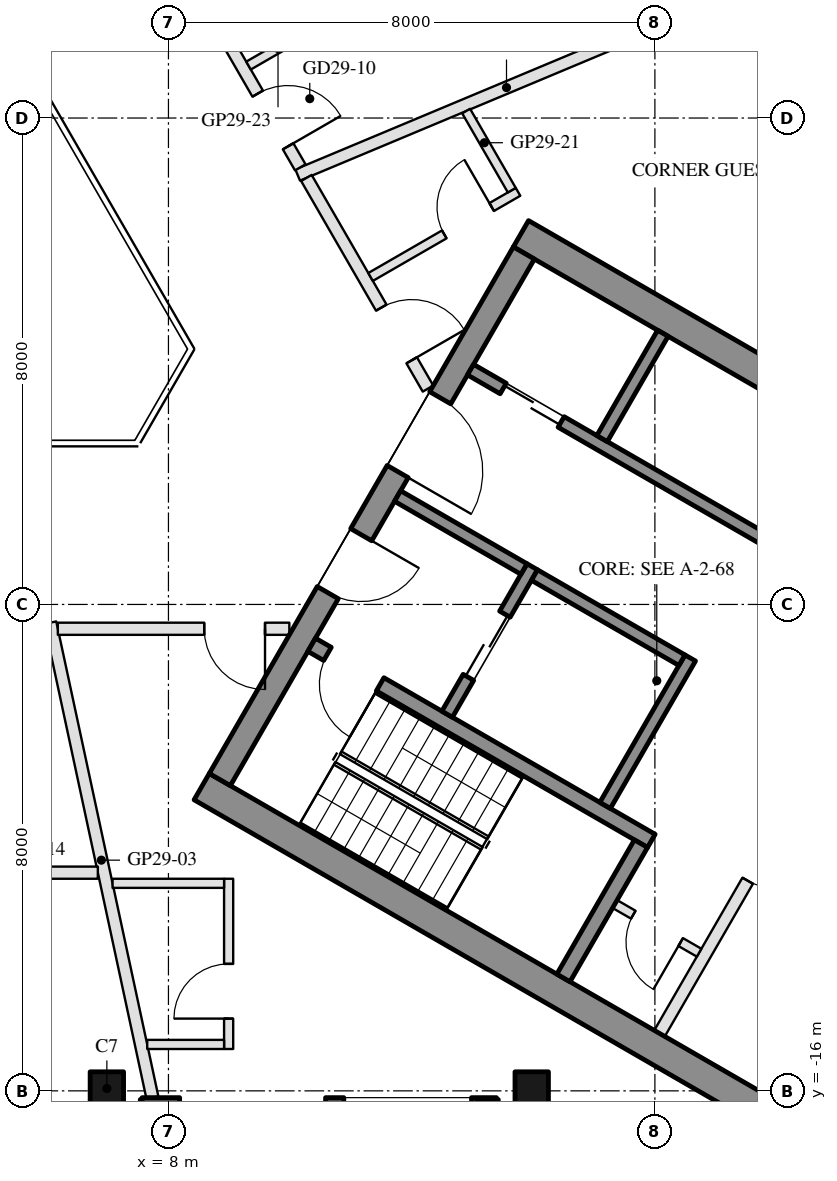
"""IFC4 building model, lengths in metres.
Left out: names, types, materials, properties, quantities, classifications, styles, units other than length and angle.
Written with IfcOpenShell. Run it as: python <this file> out.ifc"""

import sys

from ifc_helpers import new_model, si_unit, direction, frame, frame_2d, origin, origin_2d, place, context, subcontext, project, spatial, rectangle, hollow_rectangle, extrude, boolean, halfspace, element, fill, save


model = new_model("IFC4")
c1 = context("Model", 3, precision=1e-05, world=origin(), true_north=direction((0.0, 1.0)))
c2 = subcontext(c1, "Body", "Model", "MODEL_VIEW")
j1 = project(units=[si_unit("LENGTHUNIT", "METRE"), si_unit("PLANEANGLEUNIT", "RADIAN")], contexts=[c1])
p1 = place(None, origin())
s1 = spatial("IfcSite", under=j1, at=p1, CompositionType="ELEMENT")
p2 = place(p1, origin())
s2 = spatial("IfcBuilding", under=s1, at=p2, CompositionType="ELEMENT")
p3 = place(p2, frame((0.0, 0.0, 294.8)))
s3 = spatial("IfcBuildingStorey", under=s2, at=p3, CompositionType="ELEMENT", Elevation=294.8)
p4 = place(p3, frame((6.987, -15.962, 0.0), z_axis=(0.0, 0.0, 1.0), x_axis=(-1.0, 0.0, 0.0)))
e1 = element("IfcColumn", 1, at=p4, inside=s3, PredefinedType="COLUMN", context=c2, shape_type="SweptSolid", body=[
    boolean("DIFFERENCE", extrude(hollow_rectangle(XDim=0.55, YDim=0.55, WallThickness=0.025, at=origin_2d()), origin(), (0.0, 0.0, 1.0), 3.7), halfspace(frame((0.0, 0.0, 3.666), z_axis=(0.0, 0.0, 1.0), x_axis=(1.0, 0.0, 0.0)), False)),
])
p5 = place(p3, frame((13.974, -15.962, 0.0), z_axis=(0.0, 0.0, 1.0), x_axis=(-1.0, 0.0, 0.0)))
e2 = element("IfcColumn", 2, at=p5, inside=s3, PredefinedType="COLUMN", context=c2, shape_type="SweptSolid", body=[
    boolean("DIFFERENCE", extrude(hollow_rectangle(XDim=0.55, YDim=0.55, WallThickness=0.025, at=origin_2d()), origin(), (0.0, 0.0, 1.0), 3.7), halfspace(frame((0.0, 0.0, 3.66), z_axis=(0.0, 0.0, 1.0), x_axis=(1.0, 0.0, 0.0)), False)),
])
p6 = place(p3, frame((7.712, -17.362, 0.0), z_axis=(0.0, 0.0, 1.0), x_axis=(0.0, 1.0, 0.0)))
e3 = element("IfcWall", 3, at=p6, inside=s3, PredefinedType="SOLIDWALL", context=c2, shape_type="SweptSolid", body=[
    extrude(rectangle(XDim=1.22, YDim=0.35, at=frame_2d((0.61, 0.0))), origin(), (0.0, 0.0, 1.0), 3.55),
])
p7 = place(p3, frame((7.567, -16.287, 0.0), z_axis=(0.0, 0.0, 1.0), x_axis=(1.0, 0.0, 0.0)))
e4 = element("IfcWall", 4, at=p7, inside=s3, PredefinedType="SOLIDWALL", context=c2, shape_type="SweptSolid", body=[
    extrude(rectangle(XDim=5.827, YDim=0.35, at=frame_2d((2.914, 0.0))), origin(), (0.0, 0.0, 1.0), 3.55),
])
p8 = place(p7, frame((0.617, 0.0, 0.0)))
e5 = element("IfcOpeningElement", 5, at=p8, cuts=e4, PredefinedType="OPENING", context=c2, shape_type="SweptSolid", body=[
    extrude(rectangle(XDim=2.4, YDim=2.4, at=frame_2d((1.2, 1.2))), frame((0.0, 0.185, 0.0), z_axis=(0.0, -1.0, 0.0), x_axis=(1.0, 0.0, 0.0)), (0.0, 0.0, 1.0), 0.37),
])
p9 = place(p7, frame((3.317, 0.0, 0.3)))
e6 = element("IfcOpeningElement", 6, at=p9, cuts=e4, PredefinedType="OPENING", context=c2, shape_type="SweptSolid", body=[
    extrude(rectangle(XDim=2.1, YDim=2.65, at=frame_2d((1.05, 1.325))), frame((0.0, 0.185, 0.0), z_axis=(0.0, -1.0, 0.0), x_axis=(1.0, 0.0, 0.0)), (0.0, 0.0, 1.0), 0.37),
])
p10 = place(p3, frame((13.249, -16.142, 0.0), z_axis=(0.0, 0.0, 1.0), x_axis=(0.0, -1.0, 0.0)))
e7 = element("IfcWall", 7, at=p10, inside=s3, PredefinedType="SOLIDWALL", context=c2, shape_type="SweptSolid", body=[
    extrude(rectangle(XDim=1.22, YDim=0.35, at=frame_2d((0.61, 0.0))), origin(), (0.0, 0.0, 1.0), 3.55),
])
for number, where, z_axis, x_axis in (
    (8, (8.547, -10.997, 0.0), (0.0, 0.0, 1.0), (0.866, -0.5, 0.0)),
    (9, (13.797, -1.903, 0.0), (0.0, 0.0, 1.0), (0.866, -0.5, 0.0)),
):
    element("IfcWall", number, at=place(p3, frame(where, z_axis=z_axis, x_axis=x_axis)), inside=s3, PredefinedType="SHEAR", context=c2, shape_type="SweptSolid", body=[
        extrude(rectangle(XDim=11.222, YDim=0.5, at=frame_2d((5.611, 0.0))), origin(), (0.0, 0.0, 1.0), 3.5),
    ])
p11 = place(p3, frame((8.845, -10.88, 0.0), z_axis=(0.0, 0.0, 1.0), x_axis=(0.500004234368, 0.866022959057, 0.0)))
e10 = element("IfcWall", 10, at=p11, inside=s3, PredefinedType="SHEAR", context=c2, shape_type="SweptSolid", body=[
    extrude(rectangle(XDim=10.0, YDim=0.4, at=frame_2d((5.0, 0.0))), origin(), (0.0, 0.0, 1.0), 3.5),
])
p12 = place(p11, frame((3.55, 0.0, 0.0)))
e11 = element("IfcOpeningElement", 11, at=p12, cuts=e10, PredefinedType="OPENING", context=c2, shape_type="SweptSolid", body=[
    extrude(rectangle(XDim=1.1, YDim=2.1, at=frame_2d((0.55, 1.05))), frame((0.0, 0.21, 0.0), z_axis=(0.0, -1.0, 0.0), x_axis=(1.0, 0.0, 0.0)), (0.0, 0.0, 1.0), 0.42),
])
p13 = place(p11, frame((5.85, 0.0, 0.0)))
e12 = element("IfcOpeningElement", 12, at=p13, cuts=e10, PredefinedType="OPENING", context=c2, shape_type="SweptSolid", body=[
    extrude(rectangle(XDim=1.4, YDim=2.1, at=frame_2d((0.7, 1.05))), frame((0.0, 0.21, 0.0), z_axis=(0.0, -1.0, 0.0), x_axis=(1.0, 0.0, 0.0)), (0.0, 0.0, 1.0), 0.42),
])
p14 = place(p3, frame((10.356, -8.664, 0.0), z_axis=(0.0, 0.0, 1.0), x_axis=(0.866028629588, -0.499994412703, 0.0)))
e13 = element("IfcWall", 13, at=p14, inside=s3, PredefinedType="SHEAR", context=c2, shape_type="SweptSolid", body=[
    extrude(rectangle(XDim=6.45, YDim=0.25, at=frame_2d((3.225, 0.0))), origin(), (0.0, 0.0, 1.0), 3.5),
])
p15 = place(p14, frame((0.3, 0.0, 0.0)))
e14 = element("IfcOpeningElement", 14, at=p15, cuts=e13, PredefinedType="OPENING", context=c2, shape_type="SweptSolid", body=[
    extrude(rectangle(XDim=1.0, YDim=2.1, at=frame_2d((0.5, 1.05))), frame((0.0, 0.135, 0.0), z_axis=(0.0, -1.0, 0.0), x_axis=(1.0, 0.0, 0.0)), (0.0, 0.0, 1.0), 0.27),
])
p16 = place(p3, frame((14.496, -14.143, 0.0), z_axis=(0.0, 0.0, 1.0), x_axis=(0.500062241894, 0.865989465428, 0.0)))
e15 = element("IfcWall", 15, at=p16, inside=s3, PredefinedType="SHEAR", context=c2, shape_type="SweptSolid", body=[
    extrude(rectangle(XDim=2.55, YDim=0.25, at=frame_2d((1.275, 0.0))), origin(), (0.0, 0.0, 1.0), 3.5),
])
p17 = place(p3, frame((15.181, -11.305, 0.0), z_axis=(0.0, 0.0, 1.0), x_axis=(0.49994636267, 0.866056369097, 0.0)))
e16 = element("IfcWall", 16, at=p17, inside=s3, PredefinedType="SHEAR", context=c2, shape_type="SweptSolid", body=[
    extrude(rectangle(XDim=2.8, YDim=0.2, at=frame_2d((1.4, 0.0))), origin(), (0.0, 0.0, 1.0), 3.5),
])
p18 = place(p3, frame((12.583, -9.805, 0.0), z_axis=(0.0, 0.0, 1.0), x_axis=(0.49994636267, 0.866056369097, 0.0)))
e17 = element("IfcWall", 17, at=p18, inside=s3, PredefinedType="SHEAR", context=c2, shape_type="SweptSolid", body=[
    extrude(rectangle(XDim=2.8, YDim=0.2, at=frame_2d((1.4, 0.0))), origin(), (0.0, 0.0, 1.0), 3.5),
])
p19 = place(p18, frame((0.7, 0.0, 0.0)))
e18 = element("IfcOpeningElement", 18, at=p19, cuts=e17, PredefinedType="OPENING", context=c2, shape_type="SweptSolid", body=[
    extrude(rectangle(XDim=1.2, YDim=2.1, at=frame_2d((0.6, 1.05))), frame((0.0, 0.11, 0.0), z_axis=(0.0, -1.0, 0.0), x_axis=(1.0, 0.0, 0.0)), (0.0, 0.0, 1.0), 0.22),
])
p20 = place(p3, frame((11.768, -6.217, 0.0), z_axis=(0.0, 0.0, 1.0), x_axis=(0.866050077142, -0.499957262057, 0.0)))
e19 = element("IfcWall", 19, at=p20, inside=s3, PredefinedType="SHEAR", context=c2, shape_type="SweptSolid", body=[
    extrude(rectangle(XDim=2.4, YDim=0.2, at=frame_2d((1.2, 0.0))), origin(), (0.0, 0.0, 1.0), 3.5),
])
p21 = place(p3, frame((14.02, -7.517, 0.0), z_axis=(0.0, 0.0, 1.0), x_axis=(0.866034573852, -0.49998411664, 0.0)))
e20 = element("IfcWall", 20, at=p21, inside=s3, PredefinedType="SHEAR", context=c2, shape_type="SweptSolid", body=[
    extrude(rectangle(XDim=2.8, YDim=0.2, at=frame_2d((1.4, 0.0))), origin(), (0.0, 0.0, 1.0), 3.5),
])
p22 = place(p3, frame((12.968, -4.138, 0.0), z_axis=(0.0, 0.0, 1.0), x_axis=(0.866028328073, -0.49999493495, 0.0)))
e21 = element("IfcWall", 21, at=p22, inside=s3, PredefinedType="SHEAR", context=c2, shape_type="SweptSolid", body=[
    extrude(rectangle(XDim=10.16, YDim=0.2, at=frame_2d((5.08, 0.0))), origin(), (0.0, 0.0, 1.0), 3.5),
])
p23 = place(p22, frame((0.62, 0.0, 0.0)))
e22 = element("IfcOpeningElement", 22, at=p23, cuts=e21, PredefinedType="OPENING", context=c2, shape_type="SweptSolid", body=[
    extrude(rectangle(XDim=1.1, YDim=2.1, at=frame_2d((0.55, 1.05))), frame((0.0, 0.11, 0.0), z_axis=(0.0, -1.0, 0.0), x_axis=(1.0, 0.0, 0.0)), (0.0, 0.0, 1.0), 0.22),
])
p24 = place(p22, frame((5.8, 0.0, 0.0)))
e23 = element("IfcOpeningElement", 23, at=p24, cuts=e21, PredefinedType="OPENING", context=c2, shape_type="SweptSolid", body=[
    extrude(rectangle(XDim=0.9, YDim=2.1, at=frame_2d((0.45, 1.05))), frame((0.0, 0.11, 0.0), z_axis=(0.0, -1.0, 0.0), x_axis=(1.0, 0.0, 0.0)), (0.0, 0.0, 1.0), 0.22),
])
p25 = place(p3, frame((15.131, -5.272, 0.0), z_axis=(0.0, 0.0, 1.0), x_axis=(0.499972520799, 0.866041268327, 0.0)))
e24 = element("IfcWall", 24, at=p25, inside=s3, PredefinedType="SHEAR", context=c2, shape_type="SweptSolid", body=[
    extrude(rectangle(XDim=2.0, YDim=0.2, at=frame_2d((1.0, 0.0))), origin(), (0.0, 0.0, 1.0), 3.5),
])
p26 = place(p3, frame((16.076, -15.055, 0.0), z_axis=(0.0, 0.0, 1.0), x_axis=(0.499995103361, 0.866028230842, 0.0)))
e25 = element("IfcWall", 25, at=p26, inside=s3, PredefinedType="PARTITIONING", context=c2, shape_type="SweptSolid", body=[
    extrude(rectangle(XDim=5.4, YDim=0.2, at=frame_2d((2.7, 0.0))), origin(), (0.0, 0.0, 1.0), 3.5),
])
p27 = place(p26, frame((2.9, 0.0, 0.0)))
e26 = element("IfcOpeningElement", 26, at=p27, cuts=e25, PredefinedType="OPENING", context=c2, shape_type="SweptSolid", body=[
    extrude(rectangle(XDim=0.9, YDim=2.1, at=frame_2d((0.45, 1.05))), frame((0.0, 0.11, 0.0), z_axis=(0.0, -1.0, 0.0), x_axis=(1.0, 0.0, 0.0)), (0.0, 0.0, 1.0), 0.22),
])
p28 = place(p3, frame((15.342, -12.928, 0.0), z_axis=(0.0, 0.0, 1.0), x_axis=(0.865989903783, -0.500061482766, 0.0)))
e27 = element("IfcWall", 27, at=p28, inside=s3, PredefinedType="PARTITIONING", context=c2, shape_type="SweptSolid", body=[
    extrude(rectangle(XDim=1.6, YDim=0.15, at=frame_2d((0.8, 0.0))), origin(), (0.0, 0.0, 1.0), 3.5),
])
p29 = place(p28, frame((0.35, 0.0, 0.0)))
e28 = element("IfcOpeningElement", 28, at=p29, cuts=e27, PredefinedType="OPENING", context=c2, shape_type="SweptSolid", body=[
    extrude(rectangle(XDim=0.9, YDim=2.1, at=frame_2d((0.45, 1.05))), frame((0.0, 0.085, 0.0), z_axis=(0.0, -1.0, 0.0), x_axis=(1.0, 0.0, 0.0)), (0.0, 0.0, 1.0), 0.17),
])
p30 = place(p3, frame((7.737, -16.112, 0.0), z_axis=(0.0, 0.0, 1.0), x_axis=(-0.210221826162, 0.977653713646, 0.0)))
e29 = element("IfcWall", 29, at=p30, inside=s3, PredefinedType="PARTITIONING", context=c2, shape_type="SweptSolid", body=[
    extrude(rectangle(XDim=7.99, YDim=0.2, at=frame_2d((3.995, 0.0))), origin(), (0.0, 0.0, 1.0), 3.05),
])
p31 = place(p3, frame((16.994, 1.939, 0.0), z_axis=(0.0, 0.0, 1.0), x_axis=(-0.922394541425, -0.386249025824, 0.0)))
e30 = element("IfcWall", 30, at=p31, inside=s3, PredefinedType="PARTITIONING", context=c2, shape_type="SweptSolid", body=[
    extrude(rectangle(XDim=7.447, YDim=0.2, at=frame_2d((3.723, 0.0))), origin(), (0.0, 0.0, 1.0), 3.05),
])
p32 = place(p3, frame((6.839, -12.412, 0.0), z_axis=(0.0, 0.0, 1.0), x_axis=(-1.0, 0.0, 0.0)))
e31 = element("IfcWall", 31, at=p32, inside=s3, PredefinedType="PARTITIONING", context=c2, shape_type="SweptSolid", body=[
    extrude(rectangle(XDim=5.539, YDim=0.2, at=frame_2d((2.769, 0.0))), origin(), (0.0, 0.0, 1.0), 3.05),
])
p33 = place(p32, frame((2.269, 0.0, 0.0)))
e32 = element("IfcOpeningElement", 32, at=p33, cuts=e31, PredefinedType="OPENING", context=c2, shape_type="SweptSolid", body=[
    extrude(rectangle(XDim=1.0, YDim=2.1, at=frame_2d((0.5, 1.05))), frame((0.0, 0.11, 0.0), z_axis=(0.0, -1.0, 0.0), x_axis=(1.0, 0.0, 0.0)), (0.0, 0.0, 1.0), 0.22),
])
p34 = place(p3, frame((9.988, -8.4, 0.0), z_axis=(0.0, 0.0, 1.0), x_axis=(-1.0, 0.0, 0.0)))
e33 = element("IfcWall", 33, at=p34, inside=s3, PredefinedType="PARTITIONING", context=c2, shape_type="SweptSolid", body=[
    extrude(rectangle(XDim=3.807, YDim=0.2, at=frame_2d((1.904, 0.0))), origin(), (0.0, 0.0, 1.0), 3.05),
])
p35 = place(p34, frame((0.4, 0.0, 0.0)))
e34 = element("IfcOpeningElement", 34, at=p35, cuts=e33, PredefinedType="OPENING", context=c2, shape_type="SweptSolid", body=[
    extrude(rectangle(XDim=1.0, YDim=2.1, at=frame_2d((0.5, 1.05))), frame((0.0, 0.11, 0.0), z_axis=(0.0, -1.0, 0.0), x_axis=(1.0, 0.0, 0.0)), (0.0, 0.0, 1.0), 0.22),
])
p36 = place(p3, frame((8.99, -15.312, 0.0), z_axis=(0.0, 0.0, 1.0), x_axis=(0.0, 1.0, 0.0)))
e35 = element("IfcWall", 35, at=p36, inside=s3, PredefinedType="PARTITIONING", context=c2, shape_type="SweptSolid", body=[
    extrude(rectangle(XDim=2.8, YDim=0.15, at=frame_2d((1.4, 0.0))), origin(), (0.0, 0.0, 1.0), 3.1),
])
p37 = place(p36, frame((0.5, 0.0, 0.0)))
e36 = element("IfcOpeningElement", 36, at=p37, cuts=e35, PredefinedType="OPENING", context=c2, shape_type="SweptSolid", body=[
    extrude(rectangle(XDim=0.9, YDim=2.1, at=frame_2d((0.45, 1.05))), frame((0.0, 0.085, 0.0), z_axis=(0.0, -1.0, 0.0), x_axis=(1.0, 0.0, 0.0)), (0.0, 0.0, 1.0), 0.17),
])
p38 = place(p3, frame((7.651, -15.237, 0.0), z_axis=(0.0, 0.0, 1.0), x_axis=(1.0, 0.0, 0.0)))
e37 = element("IfcWall", 37, at=p38, inside=s3, PredefinedType="PARTITIONING", context=c2, shape_type="SweptSolid", body=[
    extrude(rectangle(XDim=1.264, YDim=0.15, at=frame_2d((0.632, 0.0))), origin(), (0.0, 0.0, 1.0), 3.1),
])
p39 = place(p3, frame((7.081, -12.587, 0.0), z_axis=(0.0, 0.0, 1.0), x_axis=(1.0, 0.0, 0.0)))
e38 = element("IfcWall", 38, at=p39, inside=s3, PredefinedType="PARTITIONING", context=c2, shape_type="SweptSolid", body=[
    extrude(rectangle(XDim=1.834, YDim=0.15, at=frame_2d((0.917, 0.0))), origin(), (0.0, 0.0, 1.0), 3.05),
])
p40 = place(p3, frame((10.269, -0.986, 0.0), z_axis=(0.0, 0.0, 1.0), x_axis=(0.50004472278, -0.865999581536, 0.0)))
e39 = element("IfcWall", 39, at=p40, inside=s3, PredefinedType="PARTITIONING", context=c2, shape_type="SweptSolid", body=[
    extrude(rectangle(XDim=4.0, YDim=0.2, at=frame_2d((2.0, 0.0))), origin(), (0.0, 0.0, 1.0), 3.05),
])
p41 = place(p40, frame((2.463, 0.0, 0.0)))
e40 = element("IfcOpeningElement", 40, at=p41, cuts=e39, PredefinedType="OPENING", context=c2, shape_type="SweptSolid", body=[
    extrude(rectangle(XDim=1.0, YDim=2.1, at=frame_2d((0.5, 1.05))), frame((0.0, 0.11, 0.0), z_axis=(0.0, -1.0, 0.0), x_axis=(1.0, 0.0, 0.0)), (0.0, 0.0, 1.0), 0.22),
])
p42 = place(p3, frame((11.324, -2.614, 0.0), z_axis=(0.0, 0.0, 1.0), x_axis=(0.866034573852, 0.49998411664, 0.0)))
e41 = element("IfcWall", 41, at=p42, inside=s3, PredefinedType="PARTITIONING", context=c2, shape_type="SweptSolid", body=[
    extrude(rectangle(XDim=2.8, YDim=0.15, at=frame_2d((1.4, 0.0))), origin(), (0.0, 0.0, 1.0), 3.55),
])
p43 = place(p42, frame((1.4, 0.0, 0.0)))
e42 = element("IfcOpeningElement", 42, at=p43, cuts=e41, PredefinedType="OPENING", context=c2, shape_type="SweptSolid", body=[
    extrude(rectangle(XDim=0.9, YDim=2.1, at=frame_2d((0.45, 1.05))), frame((0.0, 0.085, 0.0), z_axis=(0.0, -1.0, 0.0), x_axis=(1.0, 0.0, 0.0)), (0.0, 0.0, 1.0), 0.17),
])
p44 = place(p3, frame((13.646, -1.187, 0.0), z_axis=(0.0, 0.0, 1.0), x_axis=(-0.499985098601, 0.86603400694, 0.0)))
e43 = element("IfcWall", 43, at=p44, inside=s3, PredefinedType="PARTITIONING", context=c2, shape_type="SweptSolid", body=[
    extrude(rectangle(XDim=1.502, YDim=0.15, at=frame_2d((0.751, 0.0))), origin(), (0.0, 0.0, 1.0), 3.05),
])
p45 = place(p3, frame((8.325, 2.381, 0.0), z_axis=(0.0, 0.0, 1.0), x_axis=(0.499949858301, -0.866054351173, 0.0)))
e44 = element("IfcWall", 44, at=p45, inside=s3, PredefinedType="PARTITIONING", context=c2, shape_type="SweptSolid", body=[
    extrude(rectangle(XDim=3.687, YDim=0.2, at=frame_2d((1.843, 0.0))), origin(), (0.0, 0.0, 1.0), 3.05),
])
p46 = place(p45, frame((2.286, 0.0, 0.0)))
e45 = element("IfcOpeningElement", 45, at=p46, cuts=e44, PredefinedType="OPENING", context=c2, shape_type="SweptSolid", body=[
    extrude(rectangle(XDim=1.0, YDim=2.1, at=frame_2d((0.5, 1.05))), frame((0.0, 0.11, 0.0), z_axis=(0.0, -1.0, 0.0), x_axis=(1.0, 0.0, 0.0)), (0.0, 0.0, 1.0), 0.22),
])
p47 = place(p3, frame((9.317, 0.863, 0.0), z_axis=(0.0, 0.0, 1.0), x_axis=(0.865996816683, 0.500049511043, 0.0)))
e46 = element("IfcWall", 46, at=p47, inside=s3, PredefinedType="PARTITIONING", context=c2, shape_type="SweptSolid", body=[
    extrude(rectangle(XDim=2.8, YDim=0.15, at=frame_2d((1.4, 0.0))), origin(), (0.0, 0.0, 1.0), 3.55),
])
p48 = place(p47, frame((1.4, 0.0, 0.0)))
e47 = element("IfcOpeningElement", 47, at=p48, cuts=e46, PredefinedType="OPENING", context=c2, shape_type="SweptSolid", body=[
    extrude(rectangle(XDim=0.9, YDim=2.1, at=frame_2d((0.45, 1.05))), frame((0.0, 0.085, 0.0), z_axis=(0.0, -1.0, 0.0), x_axis=(1.0, 0.0, 0.0)), (0.0, 0.0, 1.0), 0.17),
])
p49 = place(p19, origin())
e48 = element("IfcDoor", 48, at=p49, inside=s3, OperationType="DOUBLE_DOOR_SLIDING", PredefinedType="DOOR", context=c2, shape_type="SweptSolid", body=[
    extrude(rectangle(XDim=1.2, YDim=2.1, at=frame_2d((0.6, 1.05))), frame((0.0, 0.025, 0.0), z_axis=(0.0, -1.0, 0.0), x_axis=(1.0, 0.0, 0.0)), (0.0, 0.0, 1.0), 0.05),
])
fill(e18, e48)
p50 = place(p29, frame((0.9, 0.0, 0.0), z_axis=(0.0, 0.0, 1.0), x_axis=(-1.0, 0.0, 0.0)))
e49 = element("IfcDoor", 49, at=p50, inside=s3, OperationType="SINGLE_SWING_LEFT", PredefinedType="DOOR", context=c2, shape_type="SweptSolid", body=[
    extrude(rectangle(XDim=0.9, YDim=2.1, at=frame_2d((0.45, 1.05))), frame((0.0, 0.025, 0.0), z_axis=(0.0, -1.0, 0.0), x_axis=(1.0, 0.0, 0.0)), (0.0, 0.0, 1.0), 0.05),
])
fill(e28, e49)
p51 = place(p23, origin())
e50 = element("IfcDoor", 50, at=p51, inside=s3, OperationType="DOUBLE_DOOR_SLIDING", PredefinedType="DOOR", context=c2, shape_type="SweptSolid", body=[
    extrude(rectangle(XDim=1.1, YDim=2.1, at=frame_2d((0.55, 1.05))), frame((0.0, 0.025, 0.0), z_axis=(0.0, -1.0, 0.0), x_axis=(1.0, 0.0, 0.0)), (0.0, 0.0, 1.0), 0.05),
])
fill(e22, e50)
p52 = place(p27, frame((0.9, 0.0, 0.0), z_axis=(0.0, 0.0, 1.0), x_axis=(-1.0, 0.0, 0.0)))
e51 = element("IfcDoor", 51, at=p52, inside=s3, OperationType="SINGLE_SWING_LEFT", PredefinedType="DOOR", context=c2, shape_type="SweptSolid", body=[
    extrude(rectangle(XDim=0.9, YDim=2.1, at=frame_2d((0.45, 1.05))), frame((0.0, 0.025, 0.0), z_axis=(0.0, -1.0, 0.0), x_axis=(1.0, 0.0, 0.0)), (0.0, 0.0, 1.0), 0.05),
])
fill(e26, e51)
p53 = place(p12, frame((1.1, 0.0, 0.0), z_axis=(0.0, 0.0, 1.0), x_axis=(-1.0, 0.0, 0.0)))
e52 = element("IfcDoor", 52, at=p53, inside=s3, OperationType="SINGLE_SWING_LEFT", PredefinedType="DOOR", context=c2, shape_type="SweptSolid", body=[
    extrude(rectangle(XDim=1.1, YDim=2.1, at=frame_2d((0.55, 1.05))), frame((0.0, 0.025, 0.0), z_axis=(0.0, -1.0, 0.0), x_axis=(1.0, 0.0, 0.0)), (0.0, 0.0, 1.0), 0.05),
])
fill(e11, e52)
p54 = place(p13, frame((1.4, 0.0, 0.0), z_axis=(0.0, 0.0, 1.0), x_axis=(-1.0, 0.0, 0.0)))
e53 = element("IfcDoor", 53, at=p54, inside=s3, OperationType="DOUBLE_DOOR_SINGLE_SWING", PredefinedType="DOOR", context=c2, shape_type="SweptSolid", body=[
    extrude(rectangle(XDim=1.4, YDim=2.1, at=frame_2d((0.7, 1.05))), frame((0.0, 0.025, 0.0), z_axis=(0.0, -1.0, 0.0), x_axis=(1.0, 0.0, 0.0)), (0.0, 0.0, 1.0), 0.05),
])
fill(e12, e53)
p55 = place(p15, frame((1.0, 0.0, 0.0), z_axis=(0.0, 0.0, 1.0), x_axis=(-1.0, 0.0, 0.0)))
e54 = element("IfcDoor", 54, at=p55, inside=s3, OperationType="SINGLE_SWING_LEFT", PredefinedType="DOOR", context=c2, shape_type="SweptSolid", body=[
    extrude(rectangle(XDim=1.0, YDim=2.1, at=frame_2d((0.5, 1.05))), frame((0.0, 0.025, 0.0), z_axis=(0.0, -1.0, 0.0), x_axis=(1.0, 0.0, 0.0)), (0.0, 0.0, 1.0), 0.05),
])
fill(e14, e54)
p56 = place(p37, origin())
e55 = element("IfcDoor", 55, at=p56, inside=s3, OperationType="SINGLE_SWING_LEFT", PredefinedType="DOOR", context=c2, shape_type="SweptSolid", body=[
    extrude(rectangle(XDim=0.9, YDim=2.1, at=frame_2d((0.45, 1.05))), frame((0.0, 0.025, 0.0), z_axis=(0.0, -1.0, 0.0), x_axis=(1.0, 0.0, 0.0)), (0.0, 0.0, 1.0), 0.05),
])
fill(e36, e55)
p57 = place(p35, origin())
e56 = element("IfcDoor", 56, at=p57, inside=s3, OperationType="SINGLE_SWING_LEFT", PredefinedType="DOOR", context=c2, shape_type="SweptSolid", body=[
    extrude(rectangle(XDim=1.0, YDim=2.1, at=frame_2d((0.5, 1.05))), frame((0.0, 0.025, 0.0), z_axis=(0.0, -1.0, 0.0), x_axis=(1.0, 0.0, 0.0)), (0.0, 0.0, 1.0), 0.05),
])
fill(e34, e56)
p58 = place(p43, origin())
e57 = element("IfcDoor", 57, at=p58, inside=s3, OperationType="SINGLE_SWING_RIGHT", PredefinedType="DOOR", context=c2, shape_type="SweptSolid", body=[
    extrude(rectangle(XDim=0.9, YDim=2.1, at=frame_2d((0.45, 1.05))), frame((0.0, 0.025, 0.0), z_axis=(0.0, -1.0, 0.0), x_axis=(1.0, 0.0, 0.0)), (0.0, 0.0, 1.0), 0.05),
])
fill(e42, e57)
p59 = place(p41, origin())
e58 = element("IfcDoor", 58, at=p59, inside=s3, OperationType="SINGLE_SWING_RIGHT", PredefinedType="DOOR", context=c2, shape_type="SweptSolid", body=[
    extrude(rectangle(XDim=1.0, YDim=2.1, at=frame_2d((0.5, 1.05))), frame((0.0, 0.025, 0.0), z_axis=(0.0, -1.0, 0.0), x_axis=(1.0, 0.0, 0.0)), (0.0, 0.0, 1.0), 0.05),
])
fill(e40, e58)
p60 = place(p46, origin())
e59 = element("IfcDoor", 59, at=p60, inside=s3, OperationType="SINGLE_SWING_RIGHT", PredefinedType="DOOR", context=c2, shape_type="SweptSolid", body=[
    extrude(rectangle(XDim=1.0, YDim=2.1, at=frame_2d((0.5, 1.05))), frame((0.0, 0.025, 0.0), z_axis=(0.0, -1.0, 0.0), x_axis=(1.0, 0.0, 0.0)), (0.0, 0.0, 1.0), 0.05),
])
fill(e45, e59)
save(model, sys.argv[1])
